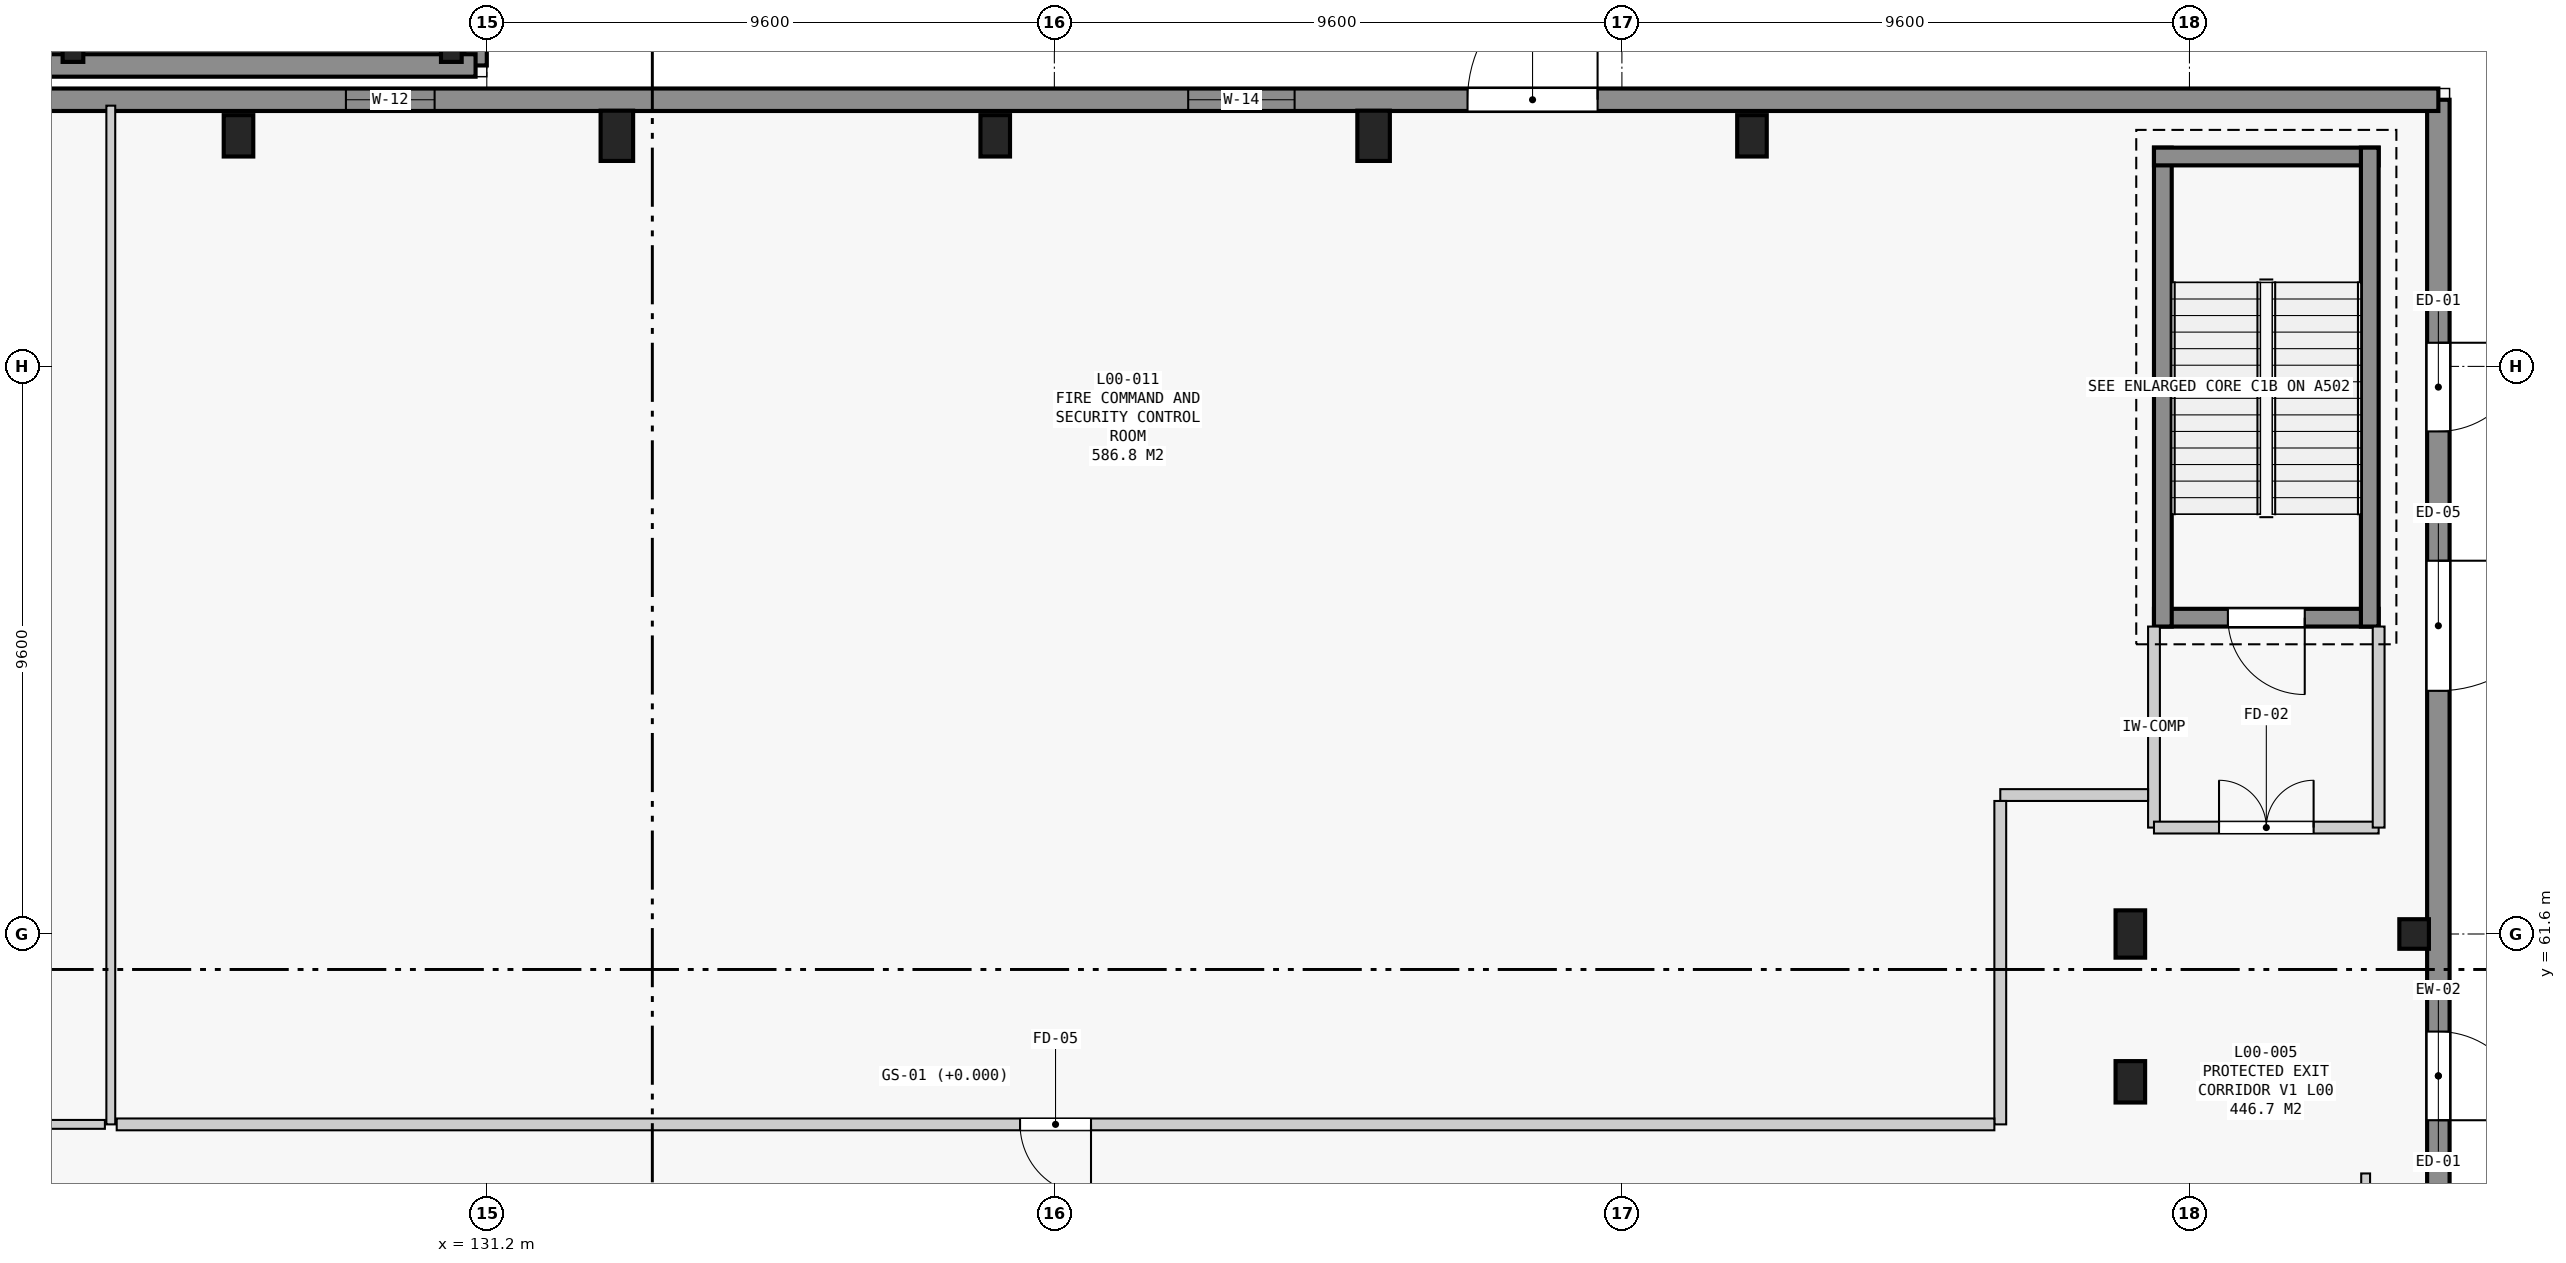
"""IFC4 building model, lengths in metres.
Left out: names, types, materials, properties, quantities, classifications, styles, units other than length and angle.
Written with IfcOpenShell. Run it as: python <this file> out.ifc"""

import sys

from ifc_helpers import new_model, si_unit, direction, frame, frame_2d, origin, origin_2d, place, context, subcontext, project, spatial, rectangle, extrude, element, fill, save


model = new_model("IFC4")
c1 = context("Model", 3, precision=1e-05, world=origin(), true_north=direction((0.0, 1.0)))
c2 = subcontext(c1, "Body", "Model", "MODEL_VIEW")
j1 = project(units=[si_unit("LENGTHUNIT", "METRE"), si_unit("PLANEANGLEUNIT", "RADIAN")], contexts=[c1])
p1 = place(None, origin())
s1 = spatial("IfcSite", under=j1, at=p1, CompositionType="ELEMENT")
p2 = place(p1, origin())
s2 = spatial("IfcBuilding", under=s1, at=p2, CompositionType="ELEMENT")
p3 = place(p2, origin())
s3 = spatial("IfcBuildingStorey", under=s2, at=p3, CompositionType="ELEMENT", Elevation=0.0)
p4 = place(p3, frame((159.0, 61.6, 0.0), z_axis=(0.0, 0.0, 1.0), x_axis=(1.0, 0.0, 0.0)))
e1 = element("IfcColumn", 1, at=p4, inside=s3, PredefinedType="COLUMN", context=c2, shape_type="SweptSolid", body=[
    extrude(rectangle(XDim=0.5, YDim=0.8, at=origin_2d()), origin(), (0.0, 0.0, 1.0), 5.4),
])
p5 = place(p3, frame((163.8, 61.6, 0.0), z_axis=(0.0, 0.0, 1.0), x_axis=(1.0, 0.0, 0.0)))
e2 = element("IfcColumn", 2, at=p5, inside=s3, PredefinedType="COLUMN", context=c2, shape_type="SweptSolid", body=[
    extrude(rectangle(XDim=0.5, YDim=0.5, at=origin_2d()), origin(), (0.0, 0.0, 1.0), 5.4),
])
p6 = place(p3, frame((127.0, 75.1, 0.0), z_axis=(0.0, 0.0, 1.0), x_axis=(1.0, 0.0, 0.0)))
e3 = element("IfcColumn", 3, at=p6, inside=s3, PredefinedType="COLUMN", context=c2, shape_type="SweptSolid", body=[
    extrude(rectangle(XDim=0.5, YDim=0.7, at=origin_2d()), origin(), (0.0, 0.0, 1.0), 5.4),
])
p7 = place(p3, frame((133.4, 75.1, 0.0), z_axis=(0.0, 0.0, 1.0), x_axis=(1.0, 0.0, 0.0)))
e4 = element("IfcColumn", 4, at=p7, inside=s3, PredefinedType="COLUMN", context=c2, shape_type="SweptSolid", body=[
    extrude(rectangle(XDim=0.55, YDim=0.85, at=origin_2d()), origin(), (0.0, 0.0, 1.0), 5.4),
])
p8 = place(p3, frame((139.8, 75.1, 0.0), z_axis=(0.0, 0.0, 1.0), x_axis=(1.0, 0.0, 0.0)))
e5 = element("IfcColumn", 5, at=p8, inside=s3, PredefinedType="COLUMN", context=c2, shape_type="SweptSolid", body=[
    extrude(rectangle(XDim=0.5, YDim=0.7, at=origin_2d()), origin(), (0.0, 0.0, 1.0), 5.4),
])
p9 = place(p3, frame((146.2, 75.1, 0.0), z_axis=(0.0, 0.0, 1.0), x_axis=(1.0, 0.0, 0.0)))
e6 = element("IfcColumn", 6, at=p9, inside=s3, PredefinedType="COLUMN", context=c2, shape_type="SweptSolid", body=[
    extrude(rectangle(XDim=0.55, YDim=0.85, at=origin_2d()), origin(), (0.0, 0.0, 1.0), 5.4),
])
for number, where, z_axis, x_axis in (
    (7, (152.6, 75.1, 0.0), (0.0, 0.0, 1.0), (1.0, 0.0, 0.0)),
    (8, (159.0, 59.1, 0.0), (0.0, 0.0, 1.0), (1.0, 0.0, 0.0)),
):
    element("IfcColumn", number, at=place(p3, frame(where, z_axis=z_axis, x_axis=x_axis)), inside=s3, PredefinedType="COLUMN", context=c2, shape_type="SweptSolid", body=[
        extrude(rectangle(XDim=0.5, YDim=0.7, at=origin_2d()), origin(), (0.0, 0.0, 1.0), 5.4),
    ])
for number, where, z_axis, x_axis in (
    (9, (124.2, 76.7, 0.0), (0.0, 0.0, 1.0), (1.0, 0.0, 0.0)),
    (10, (130.6, 76.7, 0.0), (0.0, 0.0, 1.0), (1.0, 0.0, 0.0)),
):
    element("IfcColumn", number, at=place(p3, frame(where, z_axis=z_axis, x_axis=x_axis)), inside=s3, PredefinedType="COLUMN", context=c2, shape_type="SweptSolid", body=[
        extrude(rectangle(XDim=0.35, YDim=0.7, at=origin_2d()), origin(), (0.0, 0.0, 1.0), 5.4),
    ])
p10 = place(p3, frame((164.21, 75.71, 0.0), z_axis=(0.0, 0.0, 1.0), x_axis=(0.0, -1.0, 0.0)))
e11 = element("IfcWall", 11, at=p10, inside=s3, PredefinedType="STANDARD", context=c2, shape_type="SweptSolid", body=[
    extrude(rectangle(XDim=33.02, YDim=0.38, at=frame_2d((16.51, 0.0))), origin(), (0.0, 0.0, 1.0), 5.14),
])
p11 = place(p10, frame((15.76, 0.0, 0.0)))
e12 = element("IfcOpeningElement", 12, at=p11, cuts=e11, PredefinedType="OPENING", context=c2, shape_type="SweptSolid", body=[
    extrude(rectangle(XDim=1.5, YDim=2.3, at=frame_2d((0.75, 1.15))), frame((0.0, 0.2, 0.0), z_axis=(0.0, -1.0, 0.0), x_axis=(1.0, 0.0, 0.0)), (0.0, 0.0, 1.0), 0.4),
])
p12 = place(p10, frame((7.797, 0.0, 0.0)))
e13 = element("IfcOpeningElement", 13, at=p12, cuts=e11, PredefinedType="OPENING", context=c2, shape_type="SweptSolid", body=[
    extrude(rectangle(XDim=2.2, YDim=2.5, at=frame_2d((1.1, 1.25))), frame((0.0, 0.2, 0.0), z_axis=(0.0, -1.0, 0.0), x_axis=(1.0, 0.0, 0.0)), (0.0, 0.0, 1.0), 0.4),
])
p13 = place(p10, frame((19.023, 0.0, 0.0)))
e14 = element("IfcOpeningElement", 14, at=p13, cuts=e11, PredefinedType="OPENING", context=c2, shape_type="SweptSolid", body=[
    extrude(rectangle(XDim=2.2, YDim=2.5, at=frame_2d((1.1, 1.25))), frame((0.0, 0.2, 0.0), z_axis=(0.0, -1.0, 0.0), x_axis=(1.0, 0.0, 0.0)), (0.0, 0.0, 1.0), 0.4),
])
p14 = place(p10, frame((27.41, 0.0, 0.0)))
e15 = element("IfcOpeningElement", 15, at=p14, cuts=e11, PredefinedType="OPENING", context=c2, shape_type="SweptSolid", body=[
    extrude(rectangle(XDim=1.5, YDim=2.3, at=frame_2d((0.75, 1.15))), frame((0.0, 0.2, 0.0), z_axis=(0.0, -1.0, 0.0), x_axis=(1.0, 0.0, 0.0)), (0.0, 0.0, 1.0), 0.4),
])
p15 = place(p10, frame((4.11, 0.0, 0.0)))
e16 = element("IfcOpeningElement", 16, at=p15, cuts=e11, PredefinedType="OPENING", context=c2, shape_type="SweptSolid", body=[
    extrude(rectangle(XDim=1.5, YDim=2.3, at=frame_2d((0.75, 1.15))), frame((0.0, 0.2, 0.0), z_axis=(0.0, -1.0, 0.0), x_axis=(1.0, 0.0, 0.0)), (0.0, 0.0, 1.0), 0.4),
])
p16 = place(p3, frame((111.721, 75.71, 0.0), z_axis=(0.0, 0.0, 1.0), x_axis=(1.0, 0.0, 0.0)))
e17 = element("IfcWall", 17, at=p16, inside=s3, PredefinedType="STANDARD", context=c2, shape_type="SweptSolid", body=[
    extrude(rectangle(XDim=52.489, YDim=0.38, at=frame_2d((26.245, 0.0))), origin(), (0.0, 0.0, 1.0), 5.14),
])
p17 = place(p16, frame((36.068, 0.0, 0.0)))
e18 = element("IfcOpeningElement", 18, at=p17, cuts=e17, PredefinedType="OPENING", context=c2, shape_type="SweptSolid", body=[
    extrude(rectangle(XDim=2.2, YDim=2.5, at=frame_2d((1.1, 1.25))), frame((0.0, 0.2, 0.0), z_axis=(0.0, -1.0, 0.0), x_axis=(1.0, 0.0, 0.0)), (0.0, 0.0, 1.0), 0.4),
])
p18 = place(p16, frame((17.096, 0.0, 1.05)))
e19 = element("IfcOpeningElement", 19, at=p18, cuts=e17, PredefinedType="OPENING", context=c2, shape_type="SweptSolid", body=[
    extrude(rectangle(XDim=1.5, YDim=2.6, at=frame_2d((0.75, 1.3))), frame((0.0, 0.2, 0.0), z_axis=(0.0, -1.0, 0.0), x_axis=(1.0, 0.0, 0.0)), (0.0, 0.0, 1.0), 0.4),
])
p19 = place(p16, frame((31.343, 0.0, 1.05)))
e20 = element("IfcOpeningElement", 20, at=p19, cuts=e17, PredefinedType="OPENING", context=c2, shape_type="SweptSolid", body=[
    extrude(rectangle(XDim=1.8, YDim=2.1, at=frame_2d((0.9, 1.05))), frame((0.0, 0.2, 0.0), z_axis=(0.0, -1.0, 0.0), x_axis=(1.0, 0.0, 0.0)), (0.0, 0.0, 1.0), 0.4),
])
p20 = place(p3, frame((131.01, 113.81, 0.0), z_axis=(0.0, 0.0, 1.0), x_axis=(0.0, -1.0, 0.0)))
e21 = element("IfcWall", 21, at=p20, inside=s3, PredefinedType="STANDARD", context=c2, shape_type="SweptSolid", body=[
    extrude(rectangle(XDim=37.52, YDim=0.38, at=frame_2d((18.76, 0.0))), origin(), (0.0, 0.0, 1.0), 5.14),
])
p21 = place(p20, frame((11.632, 0.0, 0.0)))
e22 = element("IfcOpeningElement", 22, at=p21, cuts=e21, PredefinedType="OPENING", context=c2, shape_type="SweptSolid", body=[
    extrude(rectangle(XDim=1.5, YDim=2.3, at=frame_2d((0.75, 1.15))), frame((0.0, 0.2, 0.0), z_axis=(0.0, -1.0, 0.0), x_axis=(1.0, 0.0, 0.0)), (0.0, 0.0, 1.0), 0.4),
])
p22 = place(p20, frame((24.388, 0.0, 0.0)))
e23 = element("IfcOpeningElement", 23, at=p22, cuts=e21, PredefinedType="OPENING", context=c2, shape_type="SweptSolid", body=[
    extrude(rectangle(XDim=1.5, YDim=2.3, at=frame_2d((0.75, 1.15))), frame((0.0, 0.2, 0.0), z_axis=(0.0, -1.0, 0.0), x_axis=(1.0, 0.0, 0.0)), (0.0, 0.0, 1.0), 0.4),
])
p23 = place(p20, frame((18.46, 0.0, 1.65)))
e24 = element("IfcOpeningElement", 24, at=p23, cuts=e21, PredefinedType="OPENING", context=c2, shape_type="SweptSolid", body=[
    extrude(rectangle(XDim=2.1, YDim=1.6, at=frame_2d((1.05, 0.8))), frame((0.0, 0.2, 0.0), z_axis=(0.0, -1.0, 0.0), x_axis=(1.0, 0.0, 0.0)), (0.0, 0.0, 1.0), 0.4),
])
p24 = place(p3, frame((131.01, 76.29, 0.0), z_axis=(0.0, 0.0, 1.0), x_axis=(-1.0, 0.0, 0.0)))
e25 = element("IfcWall", 25, at=p24, inside=s3, PredefinedType="STANDARD", context=c2, shape_type="SweptSolid", body=[
    extrude(rectangle(XDim=19.289, YDim=0.38, at=frame_2d((9.645, 0.0))), origin(), (0.0, 0.0, 1.0), 5.12),
])
p25 = place(p3, frame((163.2, 66.95, 0.0), z_axis=(0.0, 0.0, 1.0), x_axis=(-1.0, 0.0, 0.0)))
e26 = element("IfcWall", 26, at=p25, inside=s3, PredefinedType="SHEAR", context=c2, shape_type="SweptSolid", body=[
    extrude(rectangle(XDim=3.8, YDim=0.3, at=frame_2d((1.9, 0.0))), origin(), (0.0, 0.0, 1.0), 5.14),
])
p26 = place(p25, frame((1.25, 0.0, 0.0)))
e27 = element("IfcOpeningElement", 27, at=p26, cuts=e26, PredefinedType="OPENING", context=c2, shape_type="SweptSolid", body=[
    extrude(rectangle(XDim=1.3, YDim=2.2, at=frame_2d((0.65, 1.1))), frame((0.0, 0.16, 0.0), z_axis=(0.0, -1.0, 0.0), x_axis=(1.0, 0.0, 0.0)), (0.0, 0.0, 1.0), 0.32),
])
p27 = place(p3, frame((159.55, 66.8, 0.0), z_axis=(0.0, 0.0, 1.0), x_axis=(0.0, 1.0, 0.0)))
e28 = element("IfcWall", 28, at=p27, inside=s3, PredefinedType="SHEAR", context=c2, shape_type="SweptSolid", body=[
    extrude(rectangle(XDim=8.1, YDim=0.3, at=frame_2d((4.05, 0.0))), origin(), (0.0, 0.0, 1.0), 5.14),
])
p28 = place(p3, frame((159.4, 74.75, 0.0), z_axis=(0.0, 0.0, 1.0), x_axis=(1.0, 0.0, 0.0)))
e29 = element("IfcWall", 29, at=p28, inside=s3, PredefinedType="SHEAR", context=c2, shape_type="SweptSolid", body=[
    extrude(rectangle(XDim=3.8, YDim=0.3, at=frame_2d((1.9, 0.0))), origin(), (0.0, 0.0, 1.0), 5.14),
])
p29 = place(p3, frame((163.05, 74.9, 0.0), z_axis=(0.0, 0.0, 1.0), x_axis=(0.0, -1.0, 0.0)))
e30 = element("IfcWall", 30, at=p29, inside=s3, PredefinedType="SHEAR", context=c2, shape_type="SweptSolid", body=[
    extrude(rectangle(XDim=8.1, YDim=0.3, at=frame_2d((4.05, 0.0))), origin(), (0.0, 0.0, 1.0), 5.14),
])
p30 = place(p3, frame((159.4, 66.8, 0.0), z_axis=(0.0, 0.0, 1.0), x_axis=(0.0, -1.0, 0.0)))
e31 = element("IfcWall", 31, at=p30, inside=s3, PredefinedType="STANDARD", context=c2, shape_type="SweptSolid", body=[
    extrude(rectangle(XDim=3.4, YDim=0.2, at=frame_2d((1.7, 0.0))), origin(), (0.0, 0.0, 1.0), 5.14),
])
p31 = place(p3, frame((159.4, 63.4, 0.0), z_axis=(0.0, 0.0, 1.0), x_axis=(1.0, 0.0, 0.0)))
e32 = element("IfcWall", 32, at=p31, inside=s3, PredefinedType="STANDARD", context=c2, shape_type="SweptSolid", body=[
    extrude(rectangle(XDim=3.8, YDim=0.2, at=frame_2d((1.9, 0.0))), origin(), (0.0, 0.0, 1.0), 5.14),
])
p32 = place(p31, frame((1.1, 0.0, 0.0)))
e33 = element("IfcOpeningElement", 33, at=p32, cuts=e32, PredefinedType="OPENING", context=c2, shape_type="SweptSolid", body=[
    extrude(rectangle(XDim=1.6, YDim=2.2, at=frame_2d((0.8, 1.1))), frame((0.0, 0.11, 0.0), z_axis=(0.0, -1.0, 0.0), x_axis=(1.0, 0.0, 0.0)), (0.0, 0.0, 1.0), 0.22),
])
p33 = place(p3, frame((163.2, 63.4, 0.0), z_axis=(0.0, 0.0, 1.0), x_axis=(0.0, 1.0, 0.0)))
e34 = element("IfcWall", 34, at=p33, inside=s3, PredefinedType="STANDARD", context=c2, shape_type="SweptSolid", body=[
    extrude(rectangle(XDim=3.4, YDim=0.2, at=frame_2d((1.7, 0.0))), origin(), (0.0, 0.0, 1.0), 5.14),
])
p34 = place(p3, frame((162.98, 55.02, 0.0), z_axis=(0.0, 0.0, 1.0), x_axis=(0.0, 1.0, 0.0)))
e35 = element("IfcWall", 35, at=p34, inside=s3, PredefinedType="PARTITIONING", context=c2, shape_type="SweptSolid", body=[
    extrude(rectangle(XDim=2.53, YDim=0.15, at=frame_2d((1.265, 0.0))), origin(), (0.0, 0.0, 1.0), 5.14),
])
p35 = place(p3, frame((124.84, 75.61, 0.0), z_axis=(0.0, 0.0, 1.0), x_axis=(0.0, -1.0, 0.0)))
e36 = element("IfcWall", 36, at=p35, inside=s3, PredefinedType="PARTITIONING", context=c2, shape_type="SweptSolid", body=[
    extrude(rectangle(XDim=17.23, YDim=0.15, at=frame_2d((8.615, 0.0))), origin(), (0.0, 0.0, 1.0), 4.37),
])
p36 = place(p3, frame((124.74, 58.38, 0.0), z_axis=(0.0, 0.0, 1.0), x_axis=(-1.0, 0.0, 0.0)))
e37 = element("IfcWall", 37, at=p36, inside=s3, PredefinedType="PARTITIONING", context=c2, shape_type="SweptSolid", body=[
    extrude(rectangle(XDim=8.29, YDim=0.15, at=frame_2d((4.145, 0.0))), origin(), (0.0, 0.0, 1.0), 5.14),
])
p37 = place(p3, frame((159.3, 63.95, 0.0), z_axis=(0.0, 0.0, 1.0), x_axis=(-1.0, 0.0, 0.0)))
e38 = element("IfcWall", 38, at=p37, inside=s3, PredefinedType="STANDARD", context=c2, shape_type="SweptSolid", body=[
    extrude(rectangle(XDim=2.5, YDim=0.2, at=frame_2d((1.25, 0.0))), origin(), (0.0, 0.0, 1.0), 5.14),
])
p38 = place(p3, frame((156.8, 63.85, 0.0), z_axis=(0.0, 0.0, 1.0), x_axis=(0.0, -1.0, 0.0)))
e39 = element("IfcWall", 39, at=p38, inside=s3, PredefinedType="STANDARD", context=c2, shape_type="SweptSolid", body=[
    extrude(rectangle(XDim=5.47, YDim=0.2, at=frame_2d((2.735, 0.0))), origin(), (0.0, 0.0, 1.0), 5.14),
])
p39 = place(p3, frame((156.7, 58.38, 0.0), z_axis=(0.0, 0.0, 1.0), x_axis=(-1.0, 0.0, 0.0)))
e40 = element("IfcWall", 40, at=p39, inside=s3, PredefinedType="STANDARD", context=c2, shape_type="SweptSolid", body=[
    extrude(rectangle(XDim=31.76, YDim=0.2, at=frame_2d((15.88, 0.0))), origin(), (0.0, 0.0, 1.0), 5.14),
])
p40 = place(p39, frame((15.28, 0.0, 0.0)))
e41 = element("IfcOpeningElement", 41, at=p40, cuts=e40, PredefinedType="OPENING", context=c2, shape_type="SweptSolid", body=[
    extrude(rectangle(XDim=1.2, YDim=2.15, at=frame_2d((0.6, 1.075))), frame((0.0, 0.11, 0.0), z_axis=(0.0, -1.0, 0.0), x_axis=(1.0, 0.0, 0.0)), (0.0, 0.0, 1.0), 0.22),
])
p41 = place(p11, origin())
e42 = element("IfcDoor", 42, at=p41, inside=s3, OperationType="SINGLE_SWING_RIGHT", PredefinedType="DOOR", context=c2, shape_type="SweptSolid", body=[
    extrude(rectangle(XDim=1.5, YDim=2.3, at=frame_2d((0.75, 1.15))), frame((0.0, 0.025, 0.0), z_axis=(0.0, -1.0, 0.0), x_axis=(1.0, 0.0, 0.0)), (0.0, 0.0, 1.0), 0.05),
])
fill(e12, e42)
p42 = place(p12, origin())
e43 = element("IfcDoor", 43, at=p42, inside=s3, OperationType="SINGLE_SWING_LEFT", PredefinedType="DOOR", context=c2, shape_type="SweptSolid", body=[
    extrude(rectangle(XDim=2.2, YDim=2.5, at=frame_2d((1.1, 1.25))), frame((0.0, 0.025, 0.0), z_axis=(0.0, -1.0, 0.0), x_axis=(1.0, 0.0, 0.0)), (0.0, 0.0, 1.0), 0.05),
])
fill(e13, e43)
p43 = place(p17, origin())
e44 = element("IfcDoor", 44, at=p43, inside=s3, OperationType="SINGLE_SWING_RIGHT", PredefinedType="DOOR", context=c2, shape_type="SweptSolid", body=[
    extrude(rectangle(XDim=2.2, YDim=2.5, at=frame_2d((1.1, 1.25))), frame((0.0, 0.025, 0.0), z_axis=(0.0, -1.0, 0.0), x_axis=(1.0, 0.0, 0.0)), (0.0, 0.0, 1.0), 0.05),
])
fill(e18, e44)
p44 = place(p18, origin())
e45 = element("IfcWindow", 45, at=p44, inside=s3, PartitioningType="SINGLE_PANEL", PredefinedType="WINDOW", context=c2, shape_type="SweptSolid", body=[
    extrude(rectangle(XDim=1.5, YDim=2.6, at=frame_2d((0.75, 1.3))), frame((0.0, 0.03, 0.0), z_axis=(0.0, -1.0, 0.0), x_axis=(1.0, 0.0, 0.0)), (0.0, 0.0, 1.0), 0.06),
])
fill(e19, e45)
p45 = place(p19, origin())
e46 = element("IfcWindow", 46, at=p45, inside=s3, PartitioningType="SINGLE_PANEL", PredefinedType="WINDOW", context=c2, shape_type="SweptSolid", body=[
    extrude(rectangle(XDim=1.8, YDim=2.1, at=frame_2d((0.9, 1.05))), frame((0.0, 0.03, 0.0), z_axis=(0.0, -1.0, 0.0), x_axis=(1.0, 0.0, 0.0)), (0.0, 0.0, 1.0), 0.06),
])
fill(e20, e46)
p46 = place(p15, origin())
e47 = element("IfcDoor", 47, at=p46, inside=s3, OperationType="SINGLE_SWING_LEFT", PredefinedType="DOOR", context=c2, shape_type="SweptSolid", body=[
    extrude(rectangle(XDim=1.5, YDim=2.3, at=frame_2d((0.75, 1.15))), frame((0.0, 0.025, 0.0), z_axis=(0.0, -1.0, 0.0), x_axis=(1.0, 0.0, 0.0)), (0.0, 0.0, 1.0), 0.05),
])
fill(e16, e47)
p47 = place(p26, origin())
e48 = element("IfcDoor", 48, at=p47, inside=s3, OperationType="SINGLE_SWING_LEFT", PredefinedType="DOOR", context=c2, shape_type="SweptSolid", body=[
    extrude(rectangle(XDim=1.3, YDim=2.2, at=frame_2d((0.65, 1.1))), frame((0.0, 0.025, 0.0), z_axis=(0.0, -1.0, 0.0), x_axis=(1.0, 0.0, 0.0)), (0.0, 0.0, 1.0), 0.05),
])
fill(e27, e48)
p48 = place(p32, origin())
e49 = element("IfcDoor", 49, at=p48, inside=s3, OperationType="DOUBLE_DOOR_SINGLE_SWING", PredefinedType="DOOR", context=c2, shape_type="SweptSolid", body=[
    extrude(rectangle(XDim=1.6, YDim=2.2, at=frame_2d((0.8, 1.1))), frame((0.0, 0.025, 0.0), z_axis=(0.0, -1.0, 0.0), x_axis=(1.0, 0.0, 0.0)), (0.0, 0.0, 1.0), 0.05),
])
fill(e33, e49)
p49 = place(p40, origin())
e50 = element("IfcDoor", 50, at=p49, inside=s3, OperationType="SINGLE_SWING_LEFT", PredefinedType="DOOR", context=c2, shape_type="SweptSolid", body=[
    extrude(rectangle(XDim=1.2, YDim=2.15, at=frame_2d((0.6, 1.075))), frame((0.0, 0.025, 0.0), z_axis=(0.0, -1.0, 0.0), x_axis=(1.0, 0.0, 0.0)), (0.0, 0.0, 1.0), 0.05),
])
fill(e41, e50)
save(model, sys.argv[1])
